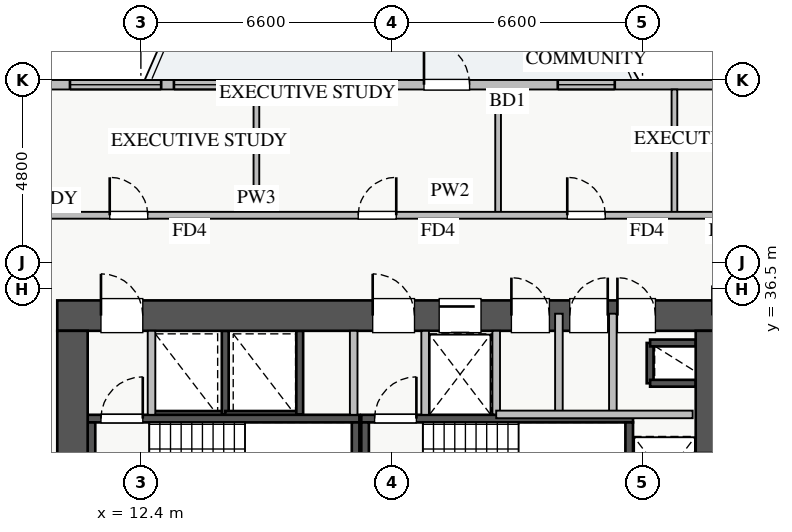
"""IFC4 building model, lengths in metres.
Left out: names, types, materials, properties, quantities, classifications, styles, units other than length and angle.
Written with IfcOpenShell. Run it as: python <this file> out.ifc"""

import sys

from ifc_helpers import new_model, si_unit, direction, frame, frame_2d, origin, place, context, subcontext, project, spatial, rectangle, extrude, source, transform, mapped, element, fill, save


model = new_model("IFC4")
c1 = context("Model", 3, precision=1e-05, world=origin(), true_north=direction((0.0, 1.0)))
c2 = subcontext(c1, "Body", "Model", "MODEL_VIEW")
j1 = project(units=[si_unit("LENGTHUNIT", "METRE"), si_unit("PLANEANGLEUNIT", "RADIAN")], contexts=[c1])
p1 = place(None, origin())
s1 = spatial("IfcSite", under=j1, at=p1, CompositionType="ELEMENT")
p2 = place(p1, origin())
s2 = spatial("IfcBuilding", under=s1, at=p2, CompositionType="ELEMENT")
p3 = place(p2, frame((0.0, 0.0, 42.5)))
s3 = spatial("IfcBuildingStorey", under=s2, at=p3, CompositionType="ELEMENT", Elevation=42.5)
p4 = place(p3, frame((12.68, 33.2, 0.0), z_axis=(0.0, 0.0, 1.0), x_axis=(1.0, 0.0, 0.0)))
e1 = element("IfcWall", 1, at=p4, inside=s3, PredefinedType="SHEAR", context=c2, shape_type="SweptSolid", body=[
    extrude(rectangle(XDim=1.94, YDim=0.18, at=frame_2d((0.97, 0.0))), origin(), (0.0, 0.0, 1.0), 3.03),
])
p5 = place(p3, frame((14.62, 33.2, 0.0), z_axis=(0.0, 0.0, 1.0), x_axis=(0.0, 1.0, 0.0)))
e2 = element("IfcWall", 2, at=p5, inside=s3, PredefinedType="SHEAR", context=c2, shape_type="SweptSolid", body=[
    extrude(rectangle(XDim=2.2, YDim=0.18, at=frame_2d((1.1, 0.0))), origin(), (0.0, 0.0, 1.0), 3.03),
])
p6 = place(p3, frame((25.8, 34.02, 0.0), z_axis=(0.0, 0.0, 1.0), x_axis=(0.0, 1.0, 0.0)))
e3 = element("IfcWall", 3, at=p6, inside=s3, PredefinedType="SHEAR", context=c2, shape_type="SweptSolid", body=[
    extrude(rectangle(XDim=1.06, YDim=0.18, at=frame_2d((0.53, 0.0))), origin(), (0.0, 0.0, 1.0), 3.03),
])
for number, where, z_axis, x_axis in (
    (4, (25.8, 35.08, 0.0), (0.0, 0.0, 1.0), (1.0, 0.0, 0.0)),
    (5, (25.8, 34.02, 0.0), (0.0, 0.0, 1.0), (1.0, 0.0, 0.0)),
):
    element("IfcWall", number, at=place(p3, frame(where, z_axis=z_axis, x_axis=x_axis)), inside=s3, PredefinedType="SHEAR", context=c2, shape_type="SweptSolid", body=[
        extrude(rectangle(XDim=1.2, YDim=0.18, at=frame_2d((0.6, 0.0))), origin(), (0.0, 0.0, 1.0), 3.03),
    ])
p7 = place(p3, frame((14.62, 33.2, 0.0), z_axis=(0.0, 0.0, 1.0), x_axis=(1.0, 0.0, 0.0)))
e6 = element("IfcWall", 6, at=p7, inside=s3, PredefinedType="SHEAR", context=c2, shape_type="SweptSolid", body=[
    extrude(rectangle(XDim=1.96, YDim=0.18, at=frame_2d((0.98, 0.0))), origin(), (0.0, 0.0, 1.0), 3.03),
])
p8 = place(p3, frame((16.58, 33.2, 0.0), z_axis=(0.0, 0.0, 1.0), x_axis=(0.0, 1.0, 0.0)))
e7 = element("IfcWall", 7, at=p8, inside=s3, PredefinedType="SHEAR", context=c2, shape_type="SweptSolid", body=[
    extrude(rectangle(XDim=2.2, YDim=0.18, at=frame_2d((1.1, 0.0))), origin(), (0.0, 0.0, 1.0), 3.03),
])
p9 = place(p3, frame((19.88, 33.2, 0.0), z_axis=(0.0, 0.0, 1.0), x_axis=(1.0, 0.0, 0.0)))
e8 = element("IfcWall", 8, at=p9, inside=s3, PredefinedType="SHEAR", context=c2, shape_type="SweptSolid", body=[
    extrude(rectangle(XDim=1.87, YDim=0.18, at=frame_2d((0.935, 0.0))), origin(), (0.0, 0.0, 1.0), 3.03),
])
p10 = place(p3, frame((11.0, 33.09, 0.0), z_axis=(0.0, 0.0, 1.0), x_axis=(1.0, 0.0, 0.0)))
e9 = element("IfcWall", 9, at=p10, inside=s3, PredefinedType="SHEAR", context=c2, shape_type="SweptSolid", body=[
    extrude(rectangle(XDim=7.15, YDim=0.2, at=frame_2d((3.575, 0.0))), origin(), (0.0, 0.0, 1.0), 3.25),
])
p11 = place(p10, frame((0.35, 0.0, 0.0)))
e10 = element("IfcOpeningElement", 10, at=p11, cuts=e9, PredefinedType="OPENING", context=c2, shape_type="SweptSolid", body=[
    extrude(rectangle(XDim=1.1, YDim=2.05, at=frame_2d((0.55, 1.025))), frame((0.0, 0.11, 0.0), z_axis=(0.0, -1.0, 0.0), x_axis=(1.0, 0.0, 0.0)), (0.0, 0.0, 1.0), 0.22),
])
for number, where, z_axis, x_axis in (
    (11, (11.1, 30.05, 0.0), (0.0, 0.0, 1.0), (0.0, 1.0, 0.0)),
    (12, (18.05, 30.05, 0.0), (0.0, 0.0, 1.0), (0.0, 1.0, 0.0)),
):
    element("IfcWall", number, at=place(p3, frame(where, z_axis=z_axis, x_axis=x_axis)), inside=s3, PredefinedType="SHEAR", context=c2, shape_type="SweptSolid", body=[
        extrude(rectangle(XDim=2.94, YDim=0.2, at=frame_2d((1.47, 0.0))), origin(), (0.0, 0.0, 1.0), 3.25),
    ])
p12 = place(p3, frame((18.2, 33.09, 0.0), z_axis=(0.0, 0.0, 1.0), x_axis=(1.0, 0.0, 0.0)))
e13 = element("IfcWall", 13, at=p12, inside=s3, PredefinedType="SHEAR", context=c2, shape_type="SweptSolid", body=[
    extrude(rectangle(XDim=7.15, YDim=0.2, at=frame_2d((3.575, 0.0))), origin(), (0.0, 0.0, 1.0), 3.25),
])
p13 = place(p12, frame((0.35, 0.0, 0.0)))
e14 = element("IfcOpeningElement", 14, at=p13, cuts=e13, PredefinedType="OPENING", context=c2, shape_type="SweptSolid", body=[
    extrude(rectangle(XDim=1.1, YDim=2.05, at=frame_2d((0.55, 1.025))), frame((0.0, 0.11, 0.0), z_axis=(0.0, -1.0, 0.0), x_axis=(1.0, 0.0, 0.0)), (0.0, 0.0, 1.0), 0.22),
])
for number, where, z_axis, x_axis in (
    (15, (18.3, 30.05, 0.0), (0.0, 0.0, 1.0), (0.0, 1.0, 0.0)),
    (16, (25.25, 30.05, 0.0), (0.0, 0.0, 1.0), (0.0, 1.0, 0.0)),
):
    element("IfcWall", number, at=place(p3, frame(where, z_axis=z_axis, x_axis=x_axis)), inside=s3, PredefinedType="SHEAR", context=c2, shape_type="SweptSolid", body=[
        extrude(rectangle(XDim=2.94, YDim=0.2, at=frame_2d((1.47, 0.0))), origin(), (0.0, 0.0, 1.0), 3.25),
    ])
p14 = place(p3, frame((10.2, 35.8, 0.0), z_axis=(0.0, 0.0, 1.0), x_axis=(1.0, 0.0, 0.0)))
e17 = element("IfcWall", 17, at=p14, inside=s3, PredefinedType="SHEAR", context=c2, shape_type="SweptSolid", body=[
    extrude(rectangle(XDim=17.6, YDim=0.8, at=frame_2d((8.8, 0.0))), origin(), (0.0, 0.0, 1.0), 3.25),
])
p15 = place(p14, frame((1.15, 0.0, 0.0)))
e18 = element("IfcOpeningElement", 18, at=p15, cuts=e17, PredefinedType="OPENING", context=c2, shape_type="SweptSolid", body=[
    extrude(rectangle(XDim=1.1, YDim=2.05, at=frame_2d((0.55, 1.025))), frame((0.0, 0.41, 0.0), z_axis=(0.0, -1.0, 0.0), x_axis=(1.0, 0.0, 0.0)), (0.0, 0.0, 1.0), 0.82),
])
p16 = place(p14, frame((8.3, 0.0, 0.0)))
e19 = element("IfcOpeningElement", 19, at=p16, cuts=e17, PredefinedType="OPENING", context=c2, shape_type="SweptSolid", body=[
    extrude(rectangle(XDim=1.1, YDim=2.05, at=frame_2d((0.55, 1.025))), frame((0.0, 0.41, 0.0), z_axis=(0.0, -1.0, 0.0), x_axis=(1.0, 0.0, 0.0)), (0.0, 0.0, 1.0), 0.82),
])
p17 = place(p14, frame((10.05, 0.0, 0.0)))
e20 = element("IfcOpeningElement", 20, at=p17, cuts=e17, PredefinedType="OPENING", context=c2, shape_type="SweptSolid", body=[
    extrude(rectangle(XDim=1.1, YDim=2.05, at=frame_2d((0.55, 1.025))), frame((0.0, 0.41, 0.0), z_axis=(0.0, -1.0, 0.0), x_axis=(1.0, 0.0, 0.0)), (0.0, 0.0, 1.0), 0.82),
])
p18 = place(p14, frame((14.74, 0.0, 0.0)))
e21 = element("IfcOpeningElement", 21, at=p18, cuts=e17, PredefinedType="OPENING", context=c2, shape_type="SweptSolid", body=[
    extrude(rectangle(XDim=1.0, YDim=2.05, at=frame_2d((0.5, 1.025))), frame((0.0, 0.41, 0.0), z_axis=(0.0, -1.0, 0.0), x_axis=(1.0, 0.0, 0.0)), (0.0, 0.0, 1.0), 0.82),
])
p19 = place(p14, frame((11.95, 0.0, 0.0)))
e22 = element("IfcOpeningElement", 22, at=p19, cuts=e17, PredefinedType="OPENING", context=c2, shape_type="SweptSolid", body=[
    extrude(rectangle(XDim=1.0, YDim=2.05, at=frame_2d((0.5, 1.025))), frame((0.0, 0.41, 0.0), z_axis=(0.0, -1.0, 0.0), x_axis=(1.0, 0.0, 0.0)), (0.0, 0.0, 1.0), 0.82),
])
p20 = place(p14, frame((13.485, 0.0, 0.0)))
e23 = element("IfcOpeningElement", 23, at=p20, cuts=e17, PredefinedType="OPENING", context=c2, shape_type="SweptSolid", body=[
    extrude(rectangle(XDim=1.0, YDim=2.05, at=frame_2d((0.5, 1.025))), frame((0.0, 0.41, 0.0), z_axis=(0.0, -1.0, 0.0), x_axis=(1.0, 0.0, 0.0)), (0.0, 0.0, 1.0), 0.82),
])
p21 = place(p3, frame((10.6, 29.8, 0.0), z_axis=(0.0, 0.0, 1.0), x_axis=(0.0, 1.0, 0.0)))
e24 = element("IfcWall", 24, at=p21, inside=s3, PredefinedType="SHEAR", context=c2, shape_type="SweptSolid", body=[
    extrude(rectangle(XDim=5.6, YDim=0.8, at=frame_2d((2.8, 0.0))), origin(), (0.0, 0.0, 1.0), 3.25),
])
p22 = place(p3, frame((27.4, 29.8, 0.0), z_axis=(0.0, 0.0, 1.0), x_axis=(0.0, 1.0, 0.0)))
e25 = element("IfcWall", 25, at=p22, inside=s3, PredefinedType="SHEAR", context=c2, shape_type="SweptSolid", body=[
    extrude(rectangle(XDim=5.6, YDim=0.8, at=frame_2d((2.8, 0.0))), origin(), (0.0, 0.0, 1.0), 3.25),
])
p23 = place(p22, frame((1.1, 0.0, 0.0)))
e26 = element("IfcOpeningElement", 26, at=p23, cuts=e25, PredefinedType="OPENING", context=c2, shape_type="SweptSolid", body=[
    extrude(rectangle(XDim=1.3, YDim=2.05, at=frame_2d((0.65, 1.025))), frame((0.0, 0.41, 0.0), z_axis=(0.0, -1.0, 0.0), x_axis=(1.0, 0.0, 0.0)), (0.0, 0.0, 1.0), 0.82),
])
p24 = place(p3, frame((5.45, 41.875, 0.0), z_axis=(0.0, 0.0, 1.0), x_axis=(1.0, 0.0, 0.0)))
e27 = element("IfcWall", 27, at=p24, inside=s3, PredefinedType="STANDARD", context=c2, shape_type="SweptSolid", body=[
    extrude(rectangle(XDim=27.1, YDim=0.25, at=frame_2d((13.55, 0.0))), origin(), (0.0, 0.0, 1.0), 2.57),
])
p25 = place(p24, frame((14.4, 0.0, 0.0)))
e28 = element("IfcOpeningElement", 28, at=p25, cuts=e27, PredefinedType="OPENING", context=c2, shape_type="SweptSolid", body=[
    extrude(rectangle(XDim=1.2, YDim=2.1, at=frame_2d((0.6, 1.05))), frame((0.0, 0.135, 0.0), z_axis=(0.0, -1.0, 0.0), x_axis=(1.0, 0.0, 0.0)), (0.0, 0.0, 1.0), 0.27),
])
p26 = place(p24, frame((1.45, 0.0, 0.9)))
e29 = element("IfcOpeningElement", 29, at=p26, cuts=e27, PredefinedType="OPENING", context=c2, shape_type="SweptSolid", body=[
    extrude(rectangle(XDim=1.5, YDim=1.5, at=frame_2d((0.75, 0.75))), frame((0.0, 0.135, 0.0), z_axis=(0.0, -1.0, 0.0), x_axis=(1.0, 0.0, 0.0)), (0.0, 0.0, 1.0), 0.27),
])
p27 = place(p24, frame((7.82, 0.0, 0.9)))
e30 = element("IfcOpeningElement", 30, at=p27, cuts=e27, PredefinedType="OPENING", context=c2, shape_type="SweptSolid", body=[
    extrude(rectangle(XDim=1.8, YDim=1.5, at=frame_2d((0.9, 0.75))), frame((0.0, 0.135, 0.0), z_axis=(0.0, -1.0, 0.0), x_axis=(1.0, 0.0, 0.0)), (0.0, 0.0, 1.0), 0.27),
])
p28 = place(p24, frame((17.92, 0.0, 0.9)))
e31 = element("IfcOpeningElement", 31, at=p28, cuts=e27, PredefinedType="OPENING", context=c2, shape_type="SweptSolid", body=[
    extrude(rectangle(XDim=1.5, YDim=1.5, at=frame_2d((0.75, 0.75))), frame((0.0, 0.135, 0.0), z_axis=(0.0, -1.0, 0.0), x_axis=(1.0, 0.0, 0.0)), (0.0, 0.0, 1.0), 0.27),
])
p29 = place(p24, frame((22.663, 0.0, 0.9)))
e32 = element("IfcOpeningElement", 32, at=p29, cuts=e27, PredefinedType="OPENING", context=c2, shape_type="SweptSolid", body=[
    extrude(rectangle(XDim=2.1, YDim=1.48, at=frame_2d((1.05, 0.74))), frame((0.0, 0.135, 0.0), z_axis=(0.0, -1.0, 0.0), x_axis=(1.0, 0.0, 0.0)), (0.0, 0.0, 1.0), 0.27),
])
p30 = place(p24, frame((5.084, 0.0, 0.9)))
e33 = element("IfcOpeningElement", 33, at=p30, cuts=e27, PredefinedType="OPENING", context=c2, shape_type="SweptSolid", body=[
    extrude(rectangle(XDim=2.4, YDim=1.5, at=frame_2d((1.2, 0.75))), frame((0.0, 0.135, 0.0), z_axis=(0.0, -1.0, 0.0), x_axis=(1.0, 0.0, 0.0)), (0.0, 0.0, 1.0), 0.27),
])
p31 = place(p24, frame((11.002, 0.0, 0.9)))
e34 = element("IfcOpeningElement", 34, at=p31, cuts=e27, PredefinedType="OPENING", context=c2, shape_type="SweptSolid", body=[
    extrude(rectangle(XDim=2.4, YDim=1.5, at=frame_2d((1.2, 0.75))), frame((0.0, 0.135, 0.0), z_axis=(0.0, -1.0, 0.0), x_axis=(1.0, 0.0, 0.0)), (0.0, 0.0, 1.0), 0.27),
])
for number, where, z_axis, x_axis in (
    (35, (12.68, 33.19, 0.0), (0.0, 0.0, 1.0), (0.0, 1.0, 0.0)),
    (36, (18.0, 33.19, 0.0), (0.0, 0.0, 1.0), (0.0, 1.0, 0.0)),
    (37, (19.88, 33.19, 0.0), (0.0, 0.0, 1.0), (0.0, 1.0, 0.0)),
):
    element("IfcWall", number, at=place(p3, frame(where, z_axis=z_axis, x_axis=x_axis)), inside=s3, PredefinedType="PARTITIONING", context=c2, shape_type="SweptSolid", body=[
        extrude(rectangle(XDim=2.21, YDim=0.2, at=frame_2d((1.105, 0.0))), origin(), (0.0, 0.0, 1.0), 3.03),
    ])
p32 = place(p3, frame((24.82, 33.2, 0.0), z_axis=(0.0, 0.0, 1.0), x_axis=(0.0, 1.0, 0.0)))
e38 = element("IfcWall", 38, at=p32, inside=s3, PredefinedType="PARTITIONING", context=c2, shape_type="SweptSolid", body=[
    extrude(rectangle(XDim=2.65, YDim=0.2, at=frame_2d((1.325, 0.0))), origin(), (0.0, 0.0, 1.0), 3.03),
])
p33 = place(p3, frame((21.75, 33.2, 0.0), z_axis=(0.0, 0.0, 1.0), x_axis=(0.0, 1.0, 0.0)))
e39 = element("IfcWall", 39, at=p33, inside=s3, PredefinedType="PARTITIONING", context=c2, shape_type="SweptSolid", body=[
    extrude(rectangle(XDim=2.2, YDim=0.2, at=frame_2d((1.1, 0.0))), origin(), (0.0, 0.0, 1.0), 3.03),
])
p34 = place(p3, frame((23.4, 33.2, 0.0), z_axis=(0.0, 0.0, 1.0), x_axis=(0.0, 1.0, 0.0)))
e40 = element("IfcWall", 40, at=p34, inside=s3, PredefinedType="PARTITIONING", context=c2, shape_type="SweptSolid", body=[
    extrude(rectangle(XDim=2.65, YDim=0.2, at=frame_2d((1.325, 0.0))), origin(), (0.0, 0.0, 1.0), 3.03),
])
p35 = place(p3, frame((21.75, 33.2, 0.0), z_axis=(0.0, 0.0, 1.0), x_axis=(1.0, 0.0, 0.0)))
e41 = element("IfcWall", 41, at=p35, inside=s3, PredefinedType="PARTITIONING", context=c2, shape_type="SweptSolid", body=[
    extrude(rectangle(XDim=5.17, YDim=0.2, at=frame_2d((2.585, 0.0))), origin(), (0.0, 0.0, 1.0), 3.03),
])
for number, where, z_axis, x_axis in (
    (42, (15.44, 38.44, 0.0), (0.0, 0.0, 1.0), (0.0, 1.0, 0.0)),
    (43, (21.8, 38.44, 0.0), (0.0, 0.0, 1.0), (0.0, 1.0, 0.0)),
    (44, (26.44, 38.44, 0.0), (0.0, 0.0, 1.0), (0.0, 1.0, 0.0)),
):
    element("IfcWall", number, at=place(p3, frame(where, z_axis=z_axis, x_axis=x_axis)), inside=s3, PredefinedType="PARTITIONING", context=c2, shape_type="SweptSolid", body=[
        extrude(rectangle(XDim=3.31, YDim=0.15, at=frame_2d((1.655, 0.0))), origin(), (0.0, 0.0, 1.0), 3.03),
    ])
p36 = place(p3, frame((8.72, 38.44, 0.0), z_axis=(0.0, 0.0, 1.0), x_axis=(1.0, 0.0, 0.0)))
e45 = element("IfcWall", 45, at=p36, inside=s3, PredefinedType="PARTITIONING", context=c2, shape_type="SweptSolid", body=[
    extrude(rectangle(XDim=23.63, YDim=0.18, at=frame_2d((11.815, 0.0))), origin(), (0.0, 0.0, 1.0), 3.03),
])
p37 = place(p36, frame((2.86, 0.0, 0.0)))
e46 = element("IfcOpeningElement", 46, at=p37, cuts=e45, PredefinedType="OPENING", context=c2, shape_type="SweptSolid", body=[
    extrude(rectangle(XDim=1.0, YDim=2.05, at=frame_2d((0.5, 1.025))), frame((0.0, 0.1, 0.0), z_axis=(0.0, -1.0, 0.0), x_axis=(1.0, 0.0, 0.0)), (0.0, 0.0, 1.0), 0.2),
])
p38 = place(p36, frame((9.4, 0.0, 0.0)))
e47 = element("IfcOpeningElement", 47, at=p38, cuts=e45, PredefinedType="OPENING", context=c2, shape_type="SweptSolid", body=[
    extrude(rectangle(XDim=1.0, YDim=2.05, at=frame_2d((0.5, 1.025))), frame((0.0, 0.1, 0.0), z_axis=(0.0, -1.0, 0.0), x_axis=(1.0, 0.0, 0.0)), (0.0, 0.0, 1.0), 0.2),
])
p39 = place(p36, frame((14.9, 0.0, 0.0)))
e48 = element("IfcOpeningElement", 48, at=p39, cuts=e45, PredefinedType="OPENING", context=c2, shape_type="SweptSolid", body=[
    extrude(rectangle(XDim=1.0, YDim=2.05, at=frame_2d((0.5, 1.025))), frame((0.0, 0.1, 0.0), z_axis=(0.0, -1.0, 0.0), x_axis=(1.0, 0.0, 0.0)), (0.0, 0.0, 1.0), 0.2),
])
p40 = place(p36, frame((20.175, 0.0, 0.0)))
e49 = element("IfcOpeningElement", 49, at=p40, cuts=e45, PredefinedType="OPENING", context=c2, shape_type="SweptSolid", body=[
    extrude(rectangle(XDim=1.0, YDim=2.05, at=frame_2d((0.5, 1.025))), frame((0.0, 0.1, 0.0), z_axis=(0.0, -1.0, 0.0), x_axis=(1.0, 0.0, 0.0)), (0.0, 0.0, 1.0), 0.2),
])
m1 = source(origin(), c2, "Body", "SweptSolid", [
    extrude(rectangle(XDim=1.2, YDim=2.1, at=frame_2d((0.6, 1.05))), frame((0.0, 0.025, 0.0), z_axis=(0.0, -1.0, 0.0), x_axis=(1.0, 0.0, 0.0)), (0.0, 0.0, 1.0), 0.05),
])
p41 = place(p25, origin())
e50 = element("IfcDoor", 50, at=p41, inside=s3, OperationType="SINGLE_SWING_LEFT", PredefinedType="DOOR", context=c2, shape_type="MappedRepresentation", body=[
    mapped(m1, transform((0.0, 0.0, 0.0), x_axis=(1.0, 0.0, 0.0), y_axis=(0.0, 1.0, 0.0), z_axis=(0.0, 0.0, 1.0), scale=1.0)),
])
fill(e28, e50)
m2 = source(origin(), c2, "Body", "SweptSolid", [
    extrude(rectangle(XDim=1.8, YDim=1.5, at=frame_2d((0.9, 0.75))), frame((0.0, 0.03, 0.0), z_axis=(0.0, -1.0, 0.0), x_axis=(1.0, 0.0, 0.0)), (0.0, 0.0, 1.0), 0.06),
])
p42 = place(p27, origin())
e51 = element("IfcWindow", 51, at=p42, inside=s3, PartitioningType="DOUBLE_PANEL_VERTICAL", PredefinedType="WINDOW", context=c2, shape_type="MappedRepresentation", body=[
    mapped(m2, transform((0.0, 0.0, 0.0), x_axis=(1.0, 0.0, 0.0), y_axis=(0.0, 1.0, 0.0), z_axis=(0.0, 0.0, 1.0), scale=1.0)),
])
fill(e30, e51)
m3 = source(origin(), c2, "Body", "SweptSolid", [
    extrude(rectangle(XDim=1.5, YDim=1.5, at=frame_2d((0.75, 0.75))), frame((0.0, 0.03, 0.0), z_axis=(0.0, -1.0, 0.0), x_axis=(1.0, 0.0, 0.0)), (0.0, 0.0, 1.0), 0.06),
])
p43 = place(p28, origin())
e52 = element("IfcWindow", 52, at=p43, inside=s3, PartitioningType="DOUBLE_PANEL_VERTICAL", PredefinedType="WINDOW", context=c2, shape_type="MappedRepresentation", body=[
    mapped(m3, transform((0.0, 0.0, 0.0), x_axis=(1.0, 0.0, 0.0), y_axis=(0.0, 1.0, 0.0), z_axis=(0.0, 0.0, 1.0), scale=1.0)),
])
fill(e31, e52)
m4 = source(origin(), c2, "Body", "SweptSolid", [
    extrude(rectangle(XDim=1.3, YDim=2.05, at=frame_2d((0.65, 1.025))), frame((0.0, 0.025, 0.0), z_axis=(0.0, -1.0, 0.0), x_axis=(1.0, 0.0, 0.0)), (0.0, 0.0, 1.0), 0.05),
])
p44 = place(p23, origin())
e53 = element("IfcDoor", 53, at=p44, inside=s3, OperationType="SLIDING_TO_LEFT", PredefinedType="DOOR", context=c2, shape_type="MappedRepresentation", body=[
    mapped(m4, transform((0.0, 0.0, 0.0), x_axis=(1.0, 0.0, 0.0), y_axis=(0.0, 1.0, 0.0), z_axis=(0.0, 0.0, 1.0), scale=1.0)),
])
fill(e26, e53)
m5 = source(origin(), c2, "Body", "SweptSolid", [
    extrude(rectangle(XDim=1.1, YDim=2.05, at=frame_2d((0.55, 1.025))), frame((0.0, 0.025, 0.0), z_axis=(0.0, -1.0, 0.0), x_axis=(1.0, 0.0, 0.0)), (0.0, 0.0, 1.0), 0.05),
])
p45 = place(p15, origin())
e54 = element("IfcDoor", 54, at=p45, inside=s3, OperationType="SINGLE_SWING_LEFT", PredefinedType="DOOR", context=c2, shape_type="MappedRepresentation", body=[
    mapped(m5, transform((0.0, 0.0, 0.0), x_axis=(1.0, 0.0, 0.0), y_axis=(0.0, 1.0, 0.0), z_axis=(0.0, 0.0, 1.0), scale=1.0)),
])
fill(e18, e54)
p46 = place(p11, origin())
e55 = element("IfcDoor", 55, at=p46, inside=s3, OperationType="SINGLE_SWING_RIGHT", PredefinedType="DOOR", context=c2, shape_type="MappedRepresentation", body=[
    mapped(m5, transform((0.0, 0.0, 0.0), x_axis=(1.0, 0.0, 0.0), y_axis=(0.0, 1.0, 0.0), z_axis=(0.0, 0.0, 1.0), scale=1.0)),
])
fill(e10, e55)
p47 = place(p16, origin())
e56 = element("IfcDoor", 56, at=p47, inside=s3, OperationType="SINGLE_SWING_LEFT", PredefinedType="DOOR", context=c2, shape_type="MappedRepresentation", body=[
    mapped(m5, transform((0.0, 0.0, 0.0), x_axis=(1.0, 0.0, 0.0), y_axis=(0.0, 1.0, 0.0), z_axis=(0.0, 0.0, 1.0), scale=1.0)),
])
fill(e19, e56)
p48 = place(p13, origin())
e57 = element("IfcDoor", 57, at=p48, inside=s3, OperationType="SINGLE_SWING_RIGHT", PredefinedType="DOOR", context=c2, shape_type="MappedRepresentation", body=[
    mapped(m5, transform((0.0, 0.0, 0.0), x_axis=(1.0, 0.0, 0.0), y_axis=(0.0, 1.0, 0.0), z_axis=(0.0, 0.0, 1.0), scale=1.0)),
])
fill(e14, e57)
p49 = place(p17, origin())
e58 = element("IfcDoor", 58, at=p49, inside=s3, OperationType="SLIDING_TO_LEFT", PredefinedType="DOOR", context=c2, shape_type="MappedRepresentation", body=[
    mapped(m5, transform((0.0, 0.0, 0.0), x_axis=(1.0, 0.0, 0.0), y_axis=(0.0, 1.0, 0.0), z_axis=(0.0, 0.0, 1.0), scale=1.0)),
])
fill(e20, e58)
m6 = source(origin(), c2, "Body", "SweptSolid", [
    extrude(rectangle(XDim=1.0, YDim=2.05, at=frame_2d((0.5, 1.025))), frame((0.0, 0.025, 0.0), z_axis=(0.0, -1.0, 0.0), x_axis=(1.0, 0.0, 0.0)), (0.0, 0.0, 1.0), 0.05),
])
p50 = place(p18, origin())
e59 = element("IfcDoor", 59, at=p50, inside=s3, OperationType="SINGLE_SWING_LEFT", PredefinedType="DOOR", context=c2, shape_type="MappedRepresentation", body=[
    mapped(m6, transform((0.0, 0.0, 0.0), x_axis=(1.0, 0.0, 0.0), y_axis=(0.0, 1.0, 0.0), z_axis=(0.0, 0.0, 1.0), scale=1.0)),
])
fill(e21, e59)
p51 = place(p19, origin())
e60 = element("IfcDoor", 60, at=p51, inside=s3, OperationType="SINGLE_SWING_LEFT", PredefinedType="DOOR", context=c2, shape_type="MappedRepresentation", body=[
    mapped(m6, transform((0.0, 0.0, 0.0), x_axis=(1.0, 0.0, 0.0), y_axis=(0.0, 1.0, 0.0), z_axis=(0.0, 0.0, 1.0), scale=1.0)),
])
fill(e22, e60)
p52 = place(p20, origin())
e61 = element("IfcDoor", 61, at=p52, inside=s3, OperationType="SINGLE_SWING_RIGHT", PredefinedType="DOOR", context=c2, shape_type="MappedRepresentation", body=[
    mapped(m6, transform((0.0, 0.0, 0.0), x_axis=(1.0, 0.0, 0.0), y_axis=(0.0, 1.0, 0.0), z_axis=(0.0, 0.0, 1.0), scale=1.0)),
])
fill(e23, e61)
p53 = place(p37, origin())
e62 = element("IfcDoor", 62, at=p53, inside=s3, OperationType="SINGLE_SWING_LEFT", PredefinedType="DOOR", context=c2, shape_type="MappedRepresentation", body=[
    mapped(m6, transform((0.0, 0.0, 0.0), x_axis=(1.0, 0.0, 0.0), y_axis=(0.0, 1.0, 0.0), z_axis=(0.0, 0.0, 1.0), scale=1.0)),
])
fill(e46, e62)
p54 = place(p38, origin())
e63 = element("IfcDoor", 63, at=p54, inside=s3, OperationType="SINGLE_SWING_RIGHT", PredefinedType="DOOR", context=c2, shape_type="MappedRepresentation", body=[
    mapped(m6, transform((0.0, 0.0, 0.0), x_axis=(1.0, 0.0, 0.0), y_axis=(0.0, 1.0, 0.0), z_axis=(0.0, 0.0, 1.0), scale=1.0)),
])
fill(e47, e63)
p55 = place(p39, origin())
e64 = element("IfcDoor", 64, at=p55, inside=s3, OperationType="SINGLE_SWING_LEFT", PredefinedType="DOOR", context=c2, shape_type="MappedRepresentation", body=[
    mapped(m6, transform((0.0, 0.0, 0.0), x_axis=(1.0, 0.0, 0.0), y_axis=(0.0, 1.0, 0.0), z_axis=(0.0, 0.0, 1.0), scale=1.0)),
])
fill(e48, e64)
m7 = source(origin(), c2, "Body", "SweptSolid", [
    extrude(rectangle(XDim=2.4, YDim=1.5, at=frame_2d((1.2, 0.75))), frame((0.0, 0.03, 0.0), z_axis=(0.0, -1.0, 0.0), x_axis=(1.0, 0.0, 0.0)), (0.0, 0.0, 1.0), 0.06),
])
p56 = place(p30, origin())
e65 = element("IfcWindow", 65, at=p56, inside=s3, PartitioningType="TRIPLE_PANEL_VERTICAL", PredefinedType="WINDOW", context=c2, shape_type="MappedRepresentation", body=[
    mapped(m7, transform((0.0, 0.0, 0.0), x_axis=(1.0, 0.0, 0.0), y_axis=(0.0, 1.0, 0.0), z_axis=(0.0, 0.0, 1.0), scale=1.0)),
])
fill(e33, e65)
p57 = place(p31, origin())
e66 = element("IfcWindow", 66, at=p57, inside=s3, PartitioningType="TRIPLE_PANEL_VERTICAL", PredefinedType="WINDOW", context=c2, shape_type="MappedRepresentation", body=[
    mapped(m7, transform((0.0, 0.0, 0.0), x_axis=(1.0, 0.0, 0.0), y_axis=(0.0, 1.0, 0.0), z_axis=(0.0, 0.0, 1.0), scale=1.0)),
])
fill(e34, e66)
save(model, sys.argv[1])
